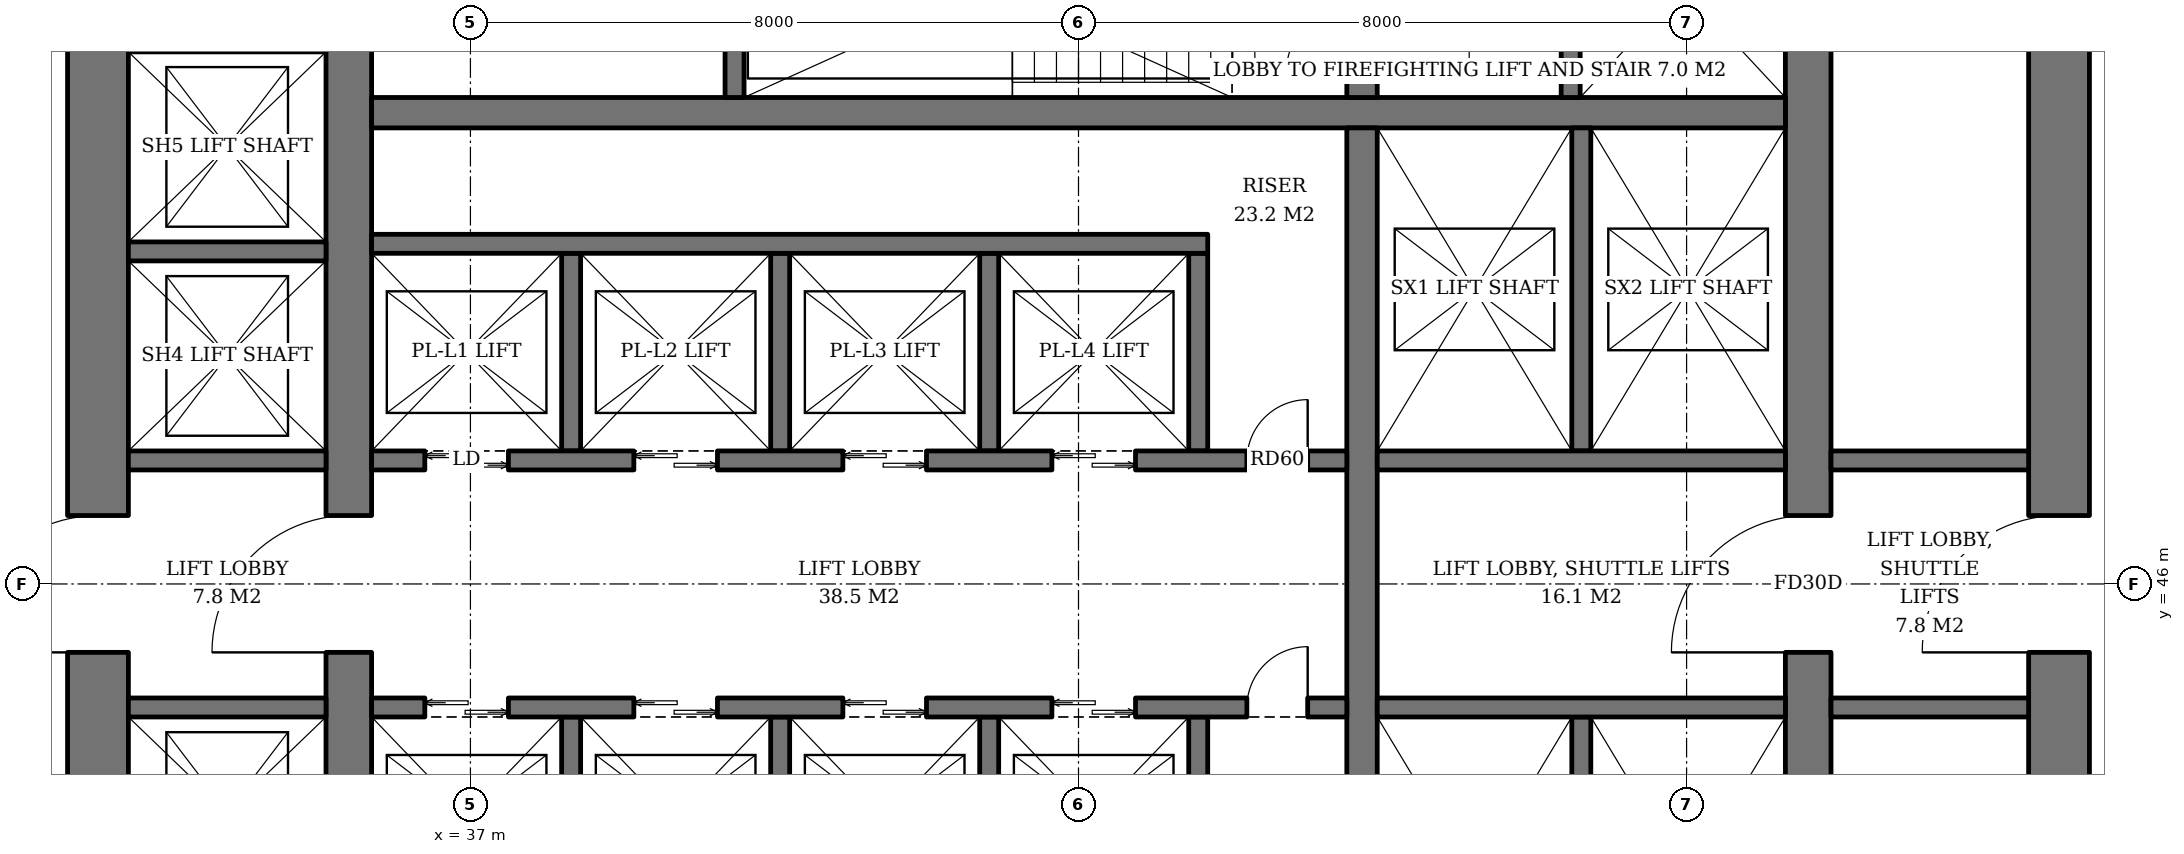
"""IFC4 building model, lengths in metres.
Left out: names, types, materials, properties, quantities, classifications, styles, units other than length and angle.
Written with IfcOpenShell. Run it as: python <this file> out.ifc"""

import sys

from ifc_helpers import new_model, si_unit, direction, frame, frame_2d, origin, place, context, subcontext, project, spatial, rectangle, extrude, element, fill, save


model = new_model("IFC4")
c1 = context("Model", 3, precision=1e-05, world=origin(), true_north=direction((0.0, 1.0)))
c2 = subcontext(c1, "Body", "Model", "MODEL_VIEW")
j1 = project(units=[si_unit("LENGTHUNIT", "METRE"), si_unit("PLANEANGLEUNIT", "RADIAN")], contexts=[c1])
p1 = place(None, origin())
s1 = spatial("IfcSite", under=j1, at=p1, CompositionType="ELEMENT")
p2 = place(p1, origin())
s2 = spatial("IfcBuilding", under=s1, at=p2, CompositionType="ELEMENT")
p3 = place(p2, frame((0.0, 0.0, 66.6)))
s3 = spatial("IfcBuildingStorey", under=s2, at=p3, CompositionType="ELEMENT", Elevation=66.6)
p4 = place(p3, frame((35.4, 36.7, 0.0), z_axis=(0.0, 0.0, 1.0), x_axis=(0.0, 1.0, 0.0)))
e1 = element("IfcWall", 1, at=p4, inside=s3, PredefinedType="SHEAR", context=c2, shape_type="SweptSolid", body=[
    extrude(rectangle(XDim=18.6, YDim=0.6, at=frame_2d((9.3, 0.0))), origin(), (0.0, 0.0, 1.0), 3.8),
])
p5 = place(p4, frame((8.4, 0.0, 0.0)))
e2 = element("IfcOpeningElement", 2, at=p5, cuts=e1, PredefinedType="OPENING", context=c2, shape_type="SweptSolid", body=[
    extrude(rectangle(XDim=1.8, YDim=2.4, at=frame_2d((0.9, 1.2))), frame((0.0, 0.31, 0.0), z_axis=(0.0, -1.0, 0.0), x_axis=(1.0, 0.0, 0.0)), (0.0, 0.0, 1.0), 0.62),
])
p6 = place(p3, frame((54.6, 36.7, 0.0), z_axis=(0.0, 0.0, 1.0), x_axis=(0.0, 1.0, 0.0)))
e3 = element("IfcWall", 3, at=p6, inside=s3, PredefinedType="SHEAR", context=c2, shape_type="SweptSolid", body=[
    extrude(rectangle(XDim=18.6, YDim=0.6, at=frame_2d((9.3, 0.0))), origin(), (0.0, 0.0, 1.0), 3.8),
])
p7 = place(p6, frame((8.4, 0.0, 0.0)))
e4 = element("IfcOpeningElement", 4, at=p7, cuts=e3, PredefinedType="OPENING", context=c2, shape_type="SweptSolid", body=[
    extrude(rectangle(XDim=1.8, YDim=2.4, at=frame_2d((0.9, 1.2))), frame((0.0, 0.31, 0.0), z_axis=(0.0, -1.0, 0.0), x_axis=(1.0, 0.0, 0.0)), (0.0, 0.0, 1.0), 0.62),
])
p8 = place(p3, frame((32.1, 33.5, 0.0), z_axis=(0.0, 0.0, 1.0), x_axis=(0.0, 1.0, 0.0)))
e5 = element("IfcWall", 5, at=p8, inside=s3, PredefinedType="SHEAR", context=c2, shape_type="SweptSolid", body=[
    extrude(rectangle(XDim=25.0, YDim=0.8, at=frame_2d((12.5, 0.0))), origin(), (0.0, 0.0, 1.0), 3.8),
])
p9 = place(p8, frame((11.6, 0.0, 0.0)))
e6 = element("IfcOpeningElement", 6, at=p9, cuts=e5, PredefinedType="OPENING", context=c2, shape_type="SweptSolid", body=[
    extrude(rectangle(XDim=1.8, YDim=2.4, at=frame_2d((0.9, 1.2))), frame((0.0, 0.41, 0.0), z_axis=(0.0, -1.0, 0.0), x_axis=(1.0, 0.0, 0.0)), (0.0, 0.0, 1.0), 0.82),
])
p10 = place(p3, frame((57.9, 33.5, 0.0), z_axis=(0.0, 0.0, 1.0), x_axis=(0.0, 1.0, 0.0)))
e7 = element("IfcWall", 7, at=p10, inside=s3, PredefinedType="SHEAR", context=c2, shape_type="SweptSolid", body=[
    extrude(rectangle(XDim=25.0, YDim=0.8, at=frame_2d((12.5, 0.0))), origin(), (0.0, 0.0, 1.0), 3.8),
])
p11 = place(p10, frame((11.6, 0.0, 0.0)))
e8 = element("IfcOpeningElement", 8, at=p11, cuts=e7, PredefinedType="OPENING", context=c2, shape_type="SweptSolid", body=[
    extrude(rectangle(XDim=1.8, YDim=2.4, at=frame_2d((0.9, 1.2))), frame((0.0, 0.41, 0.0), z_axis=(0.0, -1.0, 0.0), x_axis=(1.0, 0.0, 0.0)), (0.0, 0.0, 1.0), 0.82),
])
p12 = place(p3, frame((35.7, 52.2, 0.0), z_axis=(0.0, 0.0, 1.0), x_axis=(1.0, 0.0, 0.0)))
e9 = element("IfcWall", 9, at=p12, inside=s3, PredefinedType="SHEAR", context=c2, shape_type="SweptSolid", body=[
    extrude(rectangle(XDim=18.6, YDim=0.4, at=frame_2d((9.3, 0.0))), origin(), (0.0, 0.0, 1.0), 3.8),
])
p13 = place(p3, frame((48.73, 40.0, 0.0), z_axis=(0.0, 0.0, 1.0), x_axis=(0.0, 1.0, 0.0)))
e10 = element("IfcWall", 10, at=p13, inside=s3, PredefinedType="SHEAR", context=c2, shape_type="SweptSolid", body=[
    extrude(rectangle(XDim=12.0, YDim=0.4, at=frame_2d((6.0, 0.0))), origin(), (0.0, 0.0, 1.0), 3.8),
])
p14 = place(p3, frame((48.73, 52.4, 0.0), z_axis=(0.0, 0.0, 1.0), x_axis=(0.0, 1.0, 0.0)))
e11 = element("IfcWall", 11, at=p14, inside=s3, PredefinedType="SHEAR", context=c2, shape_type="SweptSolid", body=[
    extrude(rectangle(XDim=2.9, YDim=0.4, at=frame_2d((1.45, 0.0))), origin(), (0.0, 0.0, 1.0), 3.8),
])
p15 = place(p14, frame((0.3, 0.0, 0.0)))
e12 = element("IfcOpeningElement", 12, at=p15, cuts=e11, PredefinedType="OPENING", context=c2, shape_type="SweptSolid", body=[
    extrude(rectangle(XDim=1.0, YDim=2.1, at=frame_2d((0.5, 1.05))), frame((0.0, 0.21, 0.0), z_axis=(0.0, -1.0, 0.0), x_axis=(1.0, 0.0, 0.0)), (0.0, 0.0, 1.0), 0.42),
])
p16 = place(p3, frame((40.475, 52.4, 0.0), z_axis=(0.0, 0.0, 1.0), x_axis=(0.0, 1.0, 0.0)))
e13 = element("IfcWall", 13, at=p16, inside=s3, PredefinedType="SHEAR", context=c2, shape_type="SweptSolid", body=[
    extrude(rectangle(XDim=2.9, YDim=0.25, at=frame_2d((1.45, 0.0))), origin(), (0.0, 0.0, 1.0), 3.8),
])
p17 = place(p3, frame((51.475, 52.4, 0.0), z_axis=(0.0, 0.0, 1.0), x_axis=(0.0, 1.0, 0.0)))
e14 = element("IfcWall", 14, at=p17, inside=s3, PredefinedType="SHEAR", context=c2, shape_type="SweptSolid", body=[
    extrude(rectangle(XDim=2.9, YDim=0.25, at=frame_2d((1.45, 0.0))), origin(), (0.0, 0.0, 1.0), 3.8),
])
p18 = place(p17, frame((0.8, 0.0, 0.0)))
e15 = element("IfcOpeningElement", 15, at=p18, cuts=e14, PredefinedType="OPENING", context=c2, shape_type="SweptSolid", body=[
    extrude(rectangle(XDim=1.3, YDim=2.2, at=frame_2d((0.65, 1.1))), frame((0.0, 0.135, 0.0), z_axis=(0.0, -1.0, 0.0), x_axis=(1.0, 0.0, 0.0)), (0.0, 0.0, 1.0), 0.27),
])
for number, where, z_axis, x_axis in (
    (16, (38.325, 47.75, 0.0), (0.0, 0.0, 1.0), (0.0, 1.0, 0.0)),
    (17, (41.075, 47.75, 0.0), (0.0, 0.0, 1.0), (0.0, 1.0, 0.0)),
    (18, (43.825, 47.75, 0.0), (0.0, 0.0, 1.0), (0.0, 1.0, 0.0)),
    (19, (46.575, 47.75, 0.0), (0.0, 0.0, 1.0), (0.0, 1.0, 0.0)),
):
    element("IfcWall", number, at=place(p3, frame(where, z_axis=z_axis, x_axis=x_axis)), inside=s3, PredefinedType="SHEAR", context=c2, shape_type="SweptSolid", body=[
        extrude(rectangle(XDim=2.6, YDim=0.25, at=frame_2d((1.3, 0.0))), origin(), (0.0, 0.0, 1.0), 3.8),
    ])
p19 = place(p3, frame((35.7, 50.475, 0.0), z_axis=(0.0, 0.0, 1.0), x_axis=(1.0, 0.0, 0.0)))
e20 = element("IfcWall", 20, at=p19, inside=s3, PredefinedType="SHEAR", context=c2, shape_type="SweptSolid", body=[
    extrude(rectangle(XDim=11.0, YDim=0.25, at=frame_2d((5.5, 0.0))), origin(), (0.0, 0.0, 1.0), 3.8),
])
p20 = place(p3, frame((35.7, 47.625, 0.0), z_axis=(0.0, 0.0, 1.0), x_axis=(1.0, 0.0, 0.0)))
e21 = element("IfcWall", 21, at=p20, inside=s3, PredefinedType="SHEAR", context=c2, shape_type="SweptSolid", body=[
    extrude(rectangle(XDim=12.83, YDim=0.25, at=frame_2d((6.415, 0.0))), origin(), (0.0, 0.0, 1.0), 3.8),
])
p21 = place(p20, frame((0.7, 0.0, 0.0)))
e22 = element("IfcOpeningElement", 22, at=p21, cuts=e21, PredefinedType="OPENING", context=c2, shape_type="SweptSolid", body=[
    extrude(rectangle(XDim=1.1, YDim=2.2, at=frame_2d((0.55, 1.1))), frame((0.0, 0.135, 0.0), z_axis=(0.0, -1.0, 0.0), x_axis=(1.0, 0.0, 0.0)), (0.0, 0.0, 1.0), 0.27),
])
p22 = place(p20, frame((3.45, 0.0, 0.0)))
e23 = element("IfcOpeningElement", 23, at=p22, cuts=e21, PredefinedType="OPENING", context=c2, shape_type="SweptSolid", body=[
    extrude(rectangle(XDim=1.1, YDim=2.2, at=frame_2d((0.55, 1.1))), frame((0.0, 0.135, 0.0), z_axis=(0.0, -1.0, 0.0), x_axis=(1.0, 0.0, 0.0)), (0.0, 0.0, 1.0), 0.27),
])
p23 = place(p20, frame((6.2, 0.0, 0.0)))
e24 = element("IfcOpeningElement", 24, at=p23, cuts=e21, PredefinedType="OPENING", context=c2, shape_type="SweptSolid", body=[
    extrude(rectangle(XDim=1.1, YDim=2.2, at=frame_2d((0.55, 1.1))), frame((0.0, 0.135, 0.0), z_axis=(0.0, -1.0, 0.0), x_axis=(1.0, 0.0, 0.0)), (0.0, 0.0, 1.0), 0.27),
])
p24 = place(p20, frame((8.95, 0.0, 0.0)))
e25 = element("IfcOpeningElement", 25, at=p24, cuts=e21, PredefinedType="OPENING", context=c2, shape_type="SweptSolid", body=[
    extrude(rectangle(XDim=1.1, YDim=2.2, at=frame_2d((0.55, 1.1))), frame((0.0, 0.135, 0.0), z_axis=(0.0, -1.0, 0.0), x_axis=(1.0, 0.0, 0.0)), (0.0, 0.0, 1.0), 0.27),
])
p25 = place(p20, frame((11.515, 0.0, 0.0)))
e26 = element("IfcOpeningElement", 26, at=p25, cuts=e21, PredefinedType="OPENING", context=c2, shape_type="SweptSolid", body=[
    extrude(rectangle(XDim=0.8, YDim=2.0, at=frame_2d((0.4, 1.0))), frame((0.0, 0.135, 0.0), z_axis=(0.0, -1.0, 0.0), x_axis=(1.0, 0.0, 0.0)), (0.0, 0.0, 1.0), 0.27),
])
for number, where, z_axis, x_axis in (
    (27, (38.325, 44.25, 0.0), (0.0, 0.0, 1.0), (0.0, -1.0, 0.0)),
    (28, (41.075, 44.25, 0.0), (0.0, 0.0, 1.0), (0.0, -1.0, 0.0)),
    (29, (43.825, 44.25, 0.0), (0.0, 0.0, 1.0), (0.0, -1.0, 0.0)),
    (30, (46.575, 44.25, 0.0), (0.0, 0.0, 1.0), (0.0, -1.0, 0.0)),
):
    element("IfcWall", number, at=place(p3, frame(where, z_axis=z_axis, x_axis=x_axis)), inside=s3, PredefinedType="SHEAR", context=c2, shape_type="SweptSolid", body=[
        extrude(rectangle(XDim=2.6, YDim=0.25, at=frame_2d((1.3, 0.0))), origin(), (0.0, 0.0, 1.0), 3.8),
    ])
p26 = place(p3, frame((35.7, 44.375, 0.0), z_axis=(0.0, 0.0, 1.0), x_axis=(1.0, 0.0, 0.0)))
e31 = element("IfcWall", 31, at=p26, inside=s3, PredefinedType="SHEAR", context=c2, shape_type="SweptSolid", body=[
    extrude(rectangle(XDim=12.83, YDim=0.25, at=frame_2d((6.415, 0.0))), origin(), (0.0, 0.0, 1.0), 3.8),
])
p27 = place(p26, frame((0.7, 0.0, 0.0)))
e32 = element("IfcOpeningElement", 32, at=p27, cuts=e31, PredefinedType="OPENING", context=c2, shape_type="SweptSolid", body=[
    extrude(rectangle(XDim=1.1, YDim=2.2, at=frame_2d((0.55, 1.1))), frame((0.0, 0.135, 0.0), z_axis=(0.0, -1.0, 0.0), x_axis=(1.0, 0.0, 0.0)), (0.0, 0.0, 1.0), 0.27),
])
p28 = place(p26, frame((3.45, 0.0, 0.0)))
e33 = element("IfcOpeningElement", 33, at=p28, cuts=e31, PredefinedType="OPENING", context=c2, shape_type="SweptSolid", body=[
    extrude(rectangle(XDim=1.1, YDim=2.2, at=frame_2d((0.55, 1.1))), frame((0.0, 0.135, 0.0), z_axis=(0.0, -1.0, 0.0), x_axis=(1.0, 0.0, 0.0)), (0.0, 0.0, 1.0), 0.27),
])
p29 = place(p26, frame((6.2, 0.0, 0.0)))
e34 = element("IfcOpeningElement", 34, at=p29, cuts=e31, PredefinedType="OPENING", context=c2, shape_type="SweptSolid", body=[
    extrude(rectangle(XDim=1.1, YDim=2.2, at=frame_2d((0.55, 1.1))), frame((0.0, 0.135, 0.0), z_axis=(0.0, -1.0, 0.0), x_axis=(1.0, 0.0, 0.0)), (0.0, 0.0, 1.0), 0.27),
])
p30 = place(p26, frame((8.95, 0.0, 0.0)))
e35 = element("IfcOpeningElement", 35, at=p30, cuts=e31, PredefinedType="OPENING", context=c2, shape_type="SweptSolid", body=[
    extrude(rectangle(XDim=1.1, YDim=2.2, at=frame_2d((0.55, 1.1))), frame((0.0, 0.135, 0.0), z_axis=(0.0, -1.0, 0.0), x_axis=(1.0, 0.0, 0.0)), (0.0, 0.0, 1.0), 0.27),
])
p31 = place(p26, frame((11.515, 0.0, 0.0)))
e36 = element("IfcOpeningElement", 36, at=p31, cuts=e31, PredefinedType="OPENING", context=c2, shape_type="SweptSolid", body=[
    extrude(rectangle(XDim=0.8, YDim=2.0, at=frame_2d((0.4, 1.0))), frame((0.0, 0.135, 0.0), z_axis=(0.0, -1.0, 0.0), x_axis=(1.0, 0.0, 0.0)), (0.0, 0.0, 1.0), 0.27),
])
p32 = place(p3, frame((51.615, 47.75, 0.0), z_axis=(0.0, 0.0, 1.0), x_axis=(0.0, 1.0, 0.0)))
e37 = element("IfcWall", 37, at=p32, inside=s3, PredefinedType="SHEAR", context=c2, shape_type="SweptSolid", body=[
    extrude(rectangle(XDim=4.25, YDim=0.25, at=frame_2d((2.125, 0.0))), origin(), (0.0, 0.0, 1.0), 3.8),
])
p33 = place(p3, frame((48.93, 47.625, 0.0), z_axis=(0.0, 0.0, 1.0), x_axis=(1.0, 0.0, 0.0)))
e38 = element("IfcWall", 38, at=p33, inside=s3, PredefinedType="SHEAR", context=c2, shape_type="SweptSolid", body=[
    extrude(rectangle(XDim=5.37, YDim=0.25, at=frame_2d((2.685, 0.0))), origin(), (0.0, 0.0, 1.0), 3.8),
])
p34 = place(p3, frame((51.615, 44.25, 0.0), z_axis=(0.0, 0.0, 1.0), x_axis=(0.0, -1.0, 0.0)))
e39 = element("IfcWall", 39, at=p34, inside=s3, PredefinedType="SHEAR", context=c2, shape_type="SweptSolid", body=[
    extrude(rectangle(XDim=4.25, YDim=0.25, at=frame_2d((2.125, 0.0))), origin(), (0.0, 0.0, 1.0), 3.8),
])
p35 = place(p3, frame((48.93, 44.375, 0.0), z_axis=(0.0, 0.0, 1.0), x_axis=(1.0, 0.0, 0.0)))
e40 = element("IfcWall", 40, at=p35, inside=s3, PredefinedType="SHEAR", context=c2, shape_type="SweptSolid", body=[
    extrude(rectangle(XDim=5.37, YDim=0.25, at=frame_2d((2.685, 0.0))), origin(), (0.0, 0.0, 1.0), 3.8),
])
for number, where, z_axis, x_axis in (
    (41, (32.5, 44.375, 0.0), (0.0, 0.0, 1.0), (1.0, 0.0, 0.0)),
    (42, (32.5, 47.625, 0.0), (0.0, 0.0, 1.0), (1.0, 0.0, 0.0)),
    (43, (32.5, 50.375, 0.0), (0.0, 0.0, 1.0), (1.0, 0.0, 0.0)),
):
    element("IfcWall", number, at=place(p3, frame(where, z_axis=z_axis, x_axis=x_axis)), inside=s3, PredefinedType="SHEAR", context=c2, shape_type="SweptSolid", body=[
        extrude(rectangle(XDim=2.6, YDim=0.25, at=frame_2d((1.3, 0.0))), origin(), (0.0, 0.0, 1.0), 3.8),
    ])
for number, where, z_axis, x_axis in (
    (44, (54.9, 44.375, 0.0), (0.0, 0.0, 1.0), (1.0, 0.0, 0.0)),
    (45, (54.9, 47.625, 0.0), (0.0, 0.0, 1.0), (1.0, 0.0, 0.0)),
):
    element("IfcWall", number, at=place(p3, frame(where, z_axis=z_axis, x_axis=x_axis)), inside=s3, PredefinedType="SOLIDWALL", context=c2, shape_type="SweptSolid", body=[
        extrude(rectangle(XDim=2.6, YDim=0.25, at=frame_2d((1.3, 0.0))), origin(), (0.0, 0.0, 1.0), 3.62),
    ])
p36 = place(p21, origin())
e46 = element("IfcDoor", 46, at=p36, inside=s3, OperationType="DOUBLE_DOOR_SLIDING", PredefinedType="DOOR", context=c2, shape_type="SweptSolid", body=[
    extrude(rectangle(XDim=1.1, YDim=2.2, at=frame_2d((0.55, 1.1))), frame((0.0, 0.025, 0.0), z_axis=(0.0, -1.0, 0.0), x_axis=(1.0, 0.0, 0.0)), (0.0, 0.0, 1.0), 0.05),
])
fill(e22, e46)
p37 = place(p22, origin())
e47 = element("IfcDoor", 47, at=p37, inside=s3, OperationType="DOUBLE_DOOR_SLIDING", PredefinedType="DOOR", context=c2, shape_type="SweptSolid", body=[
    extrude(rectangle(XDim=1.1, YDim=2.2, at=frame_2d((0.55, 1.1))), frame((0.0, 0.025, 0.0), z_axis=(0.0, -1.0, 0.0), x_axis=(1.0, 0.0, 0.0)), (0.0, 0.0, 1.0), 0.05),
])
fill(e23, e47)
p38 = place(p23, origin())
e48 = element("IfcDoor", 48, at=p38, inside=s3, OperationType="DOUBLE_DOOR_SLIDING", PredefinedType="DOOR", context=c2, shape_type="SweptSolid", body=[
    extrude(rectangle(XDim=1.1, YDim=2.2, at=frame_2d((0.55, 1.1))), frame((0.0, 0.025, 0.0), z_axis=(0.0, -1.0, 0.0), x_axis=(1.0, 0.0, 0.0)), (0.0, 0.0, 1.0), 0.05),
])
fill(e24, e48)
p39 = place(p24, origin())
e49 = element("IfcDoor", 49, at=p39, inside=s3, OperationType="DOUBLE_DOOR_SLIDING", PredefinedType="DOOR", context=c2, shape_type="SweptSolid", body=[
    extrude(rectangle(XDim=1.1, YDim=2.2, at=frame_2d((0.55, 1.1))), frame((0.0, 0.025, 0.0), z_axis=(0.0, -1.0, 0.0), x_axis=(1.0, 0.0, 0.0)), (0.0, 0.0, 1.0), 0.05),
])
fill(e25, e49)
p40 = place(p25, origin())
e50 = element("IfcDoor", 50, at=p40, inside=s3, OperationType="SINGLE_SWING_RIGHT", PredefinedType="DOOR", context=c2, shape_type="SweptSolid", body=[
    extrude(rectangle(XDim=0.8, YDim=2.0, at=frame_2d((0.4, 1.0))), frame((0.0, 0.025, 0.0), z_axis=(0.0, -1.0, 0.0), x_axis=(1.0, 0.0, 0.0)), (0.0, 0.0, 1.0), 0.05),
])
fill(e26, e50)
p41 = place(p27, origin())
e51 = element("IfcDoor", 51, at=p41, inside=s3, OperationType="DOUBLE_DOOR_SLIDING", PredefinedType="DOOR", context=c2, shape_type="SweptSolid", body=[
    extrude(rectangle(XDim=1.1, YDim=2.2, at=frame_2d((0.55, 1.1))), frame((0.0, 0.025, 0.0), z_axis=(0.0, -1.0, 0.0), x_axis=(1.0, 0.0, 0.0)), (0.0, 0.0, 1.0), 0.05),
])
fill(e32, e51)
p42 = place(p28, origin())
e52 = element("IfcDoor", 52, at=p42, inside=s3, OperationType="DOUBLE_DOOR_SLIDING", PredefinedType="DOOR", context=c2, shape_type="SweptSolid", body=[
    extrude(rectangle(XDim=1.1, YDim=2.2, at=frame_2d((0.55, 1.1))), frame((0.0, 0.025, 0.0), z_axis=(0.0, -1.0, 0.0), x_axis=(1.0, 0.0, 0.0)), (0.0, 0.0, 1.0), 0.05),
])
fill(e33, e52)
p43 = place(p29, origin())
e53 = element("IfcDoor", 53, at=p43, inside=s3, OperationType="DOUBLE_DOOR_SLIDING", PredefinedType="DOOR", context=c2, shape_type="SweptSolid", body=[
    extrude(rectangle(XDim=1.1, YDim=2.2, at=frame_2d((0.55, 1.1))), frame((0.0, 0.025, 0.0), z_axis=(0.0, -1.0, 0.0), x_axis=(1.0, 0.0, 0.0)), (0.0, 0.0, 1.0), 0.05),
])
fill(e34, e53)
p44 = place(p30, origin())
e54 = element("IfcDoor", 54, at=p44, inside=s3, OperationType="DOUBLE_DOOR_SLIDING", PredefinedType="DOOR", context=c2, shape_type="SweptSolid", body=[
    extrude(rectangle(XDim=1.1, YDim=2.2, at=frame_2d((0.55, 1.1))), frame((0.0, 0.025, 0.0), z_axis=(0.0, -1.0, 0.0), x_axis=(1.0, 0.0, 0.0)), (0.0, 0.0, 1.0), 0.05),
])
fill(e35, e54)
p45 = place(p31, origin())
e55 = element("IfcDoor", 55, at=p45, inside=s3, OperationType="SINGLE_SWING_RIGHT", PredefinedType="DOOR", context=c2, shape_type="SweptSolid", body=[
    extrude(rectangle(XDim=0.8, YDim=2.0, at=frame_2d((0.4, 1.0))), frame((0.0, 0.025, 0.0), z_axis=(0.0, -1.0, 0.0), x_axis=(1.0, 0.0, 0.0)), (0.0, 0.0, 1.0), 0.05),
])
fill(e36, e55)
p46 = place(p15, origin())
e56 = element("IfcDoor", 56, at=p46, inside=s3, OperationType="SINGLE_SWING_LEFT", PredefinedType="DOOR", context=c2, shape_type="SweptSolid", body=[
    extrude(rectangle(XDim=1.0, YDim=2.1, at=frame_2d((0.5, 1.05))), frame((0.0, 0.025, 0.0), z_axis=(0.0, -1.0, 0.0), x_axis=(1.0, 0.0, 0.0)), (0.0, 0.0, 1.0), 0.05),
])
fill(e12, e56)
p47 = place(p5, origin())
e57 = element("IfcDoor", 57, at=p47, inside=s3, OperationType="DOUBLE_DOOR_SINGLE_SWING", PredefinedType="DOOR", context=c2, shape_type="SweptSolid", body=[
    extrude(rectangle(XDim=1.8, YDim=2.4, at=frame_2d((0.9, 1.2))), frame((0.0, 0.025, 0.0), z_axis=(0.0, -1.0, 0.0), x_axis=(1.0, 0.0, 0.0)), (0.0, 0.0, 1.0), 0.05),
])
fill(e2, e57)
p48 = place(p7, origin())
e58 = element("IfcDoor", 58, at=p48, inside=s3, OperationType="DOUBLE_DOOR_SINGLE_SWING", PredefinedType="DOOR", context=c2, shape_type="SweptSolid", body=[
    extrude(rectangle(XDim=1.8, YDim=2.4, at=frame_2d((0.9, 1.2))), frame((0.0, 0.025, 0.0), z_axis=(0.0, -1.0, 0.0), x_axis=(1.0, 0.0, 0.0)), (0.0, 0.0, 1.0), 0.05),
])
fill(e4, e58)
p49 = place(p9, origin())
e59 = element("IfcDoor", 59, at=p49, inside=s3, OperationType="DOUBLE_DOOR_SINGLE_SWING", PredefinedType="DOOR", context=c2, shape_type="SweptSolid", body=[
    extrude(rectangle(XDim=1.8, YDim=2.4, at=frame_2d((0.9, 1.2))), frame((0.0, 0.025, 0.0), z_axis=(0.0, -1.0, 0.0), x_axis=(1.0, 0.0, 0.0)), (0.0, 0.0, 1.0), 0.05),
])
fill(e6, e59)
p50 = place(p11, origin())
e60 = element("IfcDoor", 60, at=p50, inside=s3, OperationType="DOUBLE_DOOR_SINGLE_SWING", PredefinedType="DOOR", context=c2, shape_type="SweptSolid", body=[
    extrude(rectangle(XDim=1.8, YDim=2.4, at=frame_2d((0.9, 1.2))), frame((0.0, 0.025, 0.0), z_axis=(0.0, -1.0, 0.0), x_axis=(1.0, 0.0, 0.0)), (0.0, 0.0, 1.0), 0.05),
])
fill(e8, e60)
save(model, sys.argv[1])
